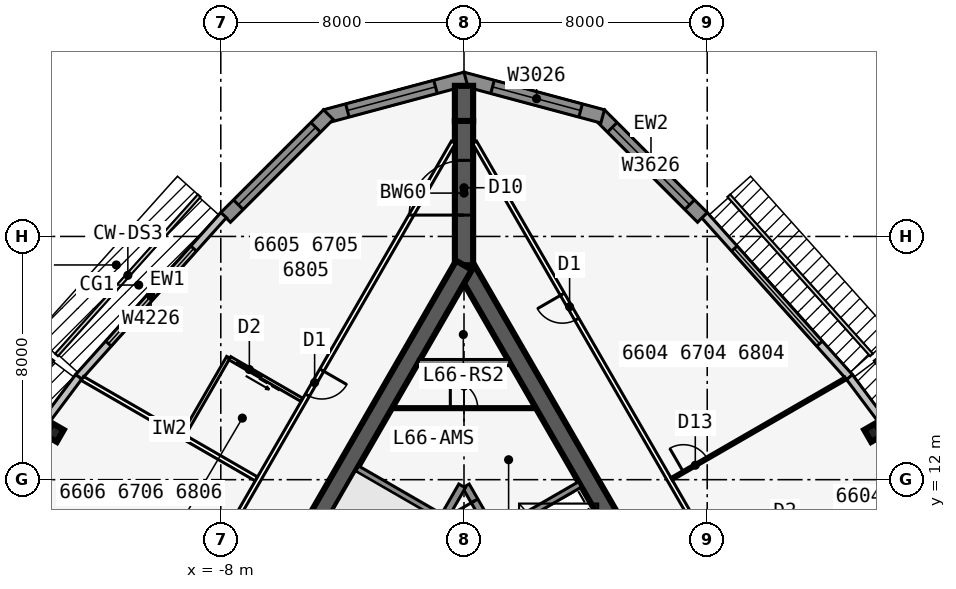
"""IFC4 building model, lengths in metres.
Left out: names, types, materials, properties, quantities, classifications, styles, units other than length and angle.
Written with IfcOpenShell. Run it as: python <this file> out.ifc"""

import sys

from ifc_helpers import new_model, si_unit, direction, frame, frame_2d, origin, origin_2d, place, context, subcontext, project, spatial, polyline, rectangle, i_section, outline, extrude, element, fill, save


model = new_model("IFC4")
c1 = context("Model", 3, precision=1e-05, world=origin(), true_north=direction((0.0, 1.0)))
c2 = subcontext(c1, "Body", "Model", "MODEL_VIEW")
j1 = project(units=[si_unit("LENGTHUNIT", "METRE"), si_unit("PLANEANGLEUNIT", "RADIAN")], contexts=[c1])
p1 = place(None, origin())
s1 = spatial("IfcSite", under=j1, at=p1, CompositionType="ELEMENT")
p2 = place(p1, origin())
s2 = spatial("IfcBuilding", under=s1, at=p2, CompositionType="ELEMENT")
p3 = place(p2, frame((0.0, 0.0, 250.1)))
s3 = spatial("IfcBuildingStorey", under=s2, at=p3, CompositionType="ELEMENT", Elevation=250.1)
p4 = place(p3, frame((16.5, -9.526, 0.0), z_axis=(0.0, 0.0, 1.0), x_axis=(-0.499999749417, 0.866025548458, 0.0)))
e1 = element("IfcWall", 1, at=p4, inside=s3, PredefinedType="SHEAR", context=c2, shape_type="SweptSolid", body=[
    extrude(rectangle(XDim=33.0, YDim=0.6, at=frame_2d((16.5, 0.0))), origin(), (0.0, 0.0, 1.0), 3.6),
])
p5 = place(p4, frame((14.15, 0.0, 0.0)))
e2 = element("IfcOpeningElement", 2, at=p5, cuts=e1, PredefinedType="OPENING", context=c2, shape_type="SweptSolid", body=[
    extrude(rectangle(XDim=1.8, YDim=2.13, at=frame_2d((0.9, 1.065))), frame((0.0, 0.31, 0.0), z_axis=(0.0, -1.0, 0.0), x_axis=(1.0, 0.0, 0.0)), (0.0, 0.0, 1.0), 0.62),
])
p6 = place(p4, frame((12.6, 0.0, 0.0)))
e3 = element("IfcOpeningElement", 3, at=p6, cuts=e1, PredefinedType="OPENING", context=c2, shape_type="SweptSolid", body=[
    extrude(rectangle(XDim=1.0, YDim=2.13, at=frame_2d((0.5, 1.065))), frame((0.0, 0.31, 0.0), z_axis=(0.0, -1.0, 0.0), x_axis=(1.0, 0.0, 0.0)), (0.0, 0.0, 1.0), 0.62),
])
p7 = place(p3, frame((5.379, 2.586, 0.0), z_axis=(0.0, 0.0, 1.0), x_axis=(-0.500001375892, 0.866024609411, 0.0)))
e4 = element("IfcWall", 4, at=p7, inside=s3, PredefinedType="SOLIDWALL", context=c2, shape_type="SweptSolid", body=[
    extrude(rectangle(XDim=10.633, YDim=0.25, at=frame_2d((5.316, 0.0))), origin(), (0.0, 0.0, 1.0), 3.435),
])
p8 = place(p7, frame((9.164, 0.0, 0.0)))
e5 = element("IfcOpeningElement", 5, at=p8, cuts=e4, PredefinedType="OPENING", context=c2, shape_type="SweptSolid", body=[
    extrude(rectangle(XDim=0.9, YDim=2.13, at=frame_2d((0.45, 1.065))), frame((0.0, 0.135, 0.0), z_axis=(0.0, -1.0, 0.0), x_axis=(1.0, 0.0, 0.0)), (0.0, 0.0, 1.0), 0.27),
])
p9 = place(p7, frame((1.0, 0.0, 0.0)))
e6 = element("IfcOpeningElement", 6, at=p9, cuts=e4, PredefinedType="OPENING", context=c2, shape_type="SweptSolid", body=[
    extrude(rectangle(XDim=1.1, YDim=2.13, at=frame_2d((0.55, 1.065))), frame((0.0, 0.135, 0.0), z_axis=(0.0, -1.0, 0.0), x_axis=(1.0, 0.0, 0.0)), (0.0, 0.0, 1.0), 0.27),
])
p10 = place(p7, frame((3.9, 0.0, 0.0)))
e7 = element("IfcOpeningElement", 7, at=p10, cuts=e4, PredefinedType="OPENING", context=c2, shape_type="SweptSolid", body=[
    extrude(rectangle(XDim=1.1, YDim=2.13, at=frame_2d((0.55, 1.065))), frame((0.0, 0.135, 0.0), z_axis=(0.0, -1.0, 0.0), x_axis=(1.0, 0.0, 0.0)), (0.0, 0.0, 1.0), 0.27),
])
p11 = place(p7, frame((6.8, 0.0, 0.0)))
e8 = element("IfcOpeningElement", 8, at=p11, cuts=e4, PredefinedType="OPENING", context=c2, shape_type="SweptSolid", body=[
    extrude(rectangle(XDim=1.1, YDim=2.13, at=frame_2d((0.55, 1.065))), frame((0.0, 0.135, 0.0), z_axis=(0.0, -1.0, 0.0), x_axis=(1.0, 0.0, 0.0)), (0.0, 0.0, 1.0), 0.27),
])
p12 = place(p3, frame((0.979, 10.207, 0.0), z_axis=(0.0, 0.0, 1.0), x_axis=(0.866027924134, 0.499995634601, 0.0)))
e9 = element("IfcWall", 9, at=p12, inside=s3, PredefinedType="SOLIDWALL", context=c2, shape_type="SweptSolid", body=[
    extrude(rectangle(XDim=3.275, YDim=0.2, at=frame_2d((1.637, 0.0))), origin(), (0.0, 0.0, 1.0), 3.435),
])
p13 = place(p3, frame((0.0, 19.052, 0.0), z_axis=(0.0, 0.0, 1.0), x_axis=(-0.499999749417, -0.866025548458, 0.0)))
e10 = element("IfcWall", 10, at=p13, inside=s3, PredefinedType="SHEAR", context=c2, shape_type="SweptSolid", body=[
    extrude(rectangle(XDim=33.0, YDim=0.6, at=frame_2d((16.5, 0.0))), origin(), (0.0, 0.0, 1.0), 3.6),
])
p14 = place(p13, frame((14.15, 0.0, 0.0)))
e11 = element("IfcOpeningElement", 11, at=p14, cuts=e10, PredefinedType="OPENING", context=c2, shape_type="SweptSolid", body=[
    extrude(rectangle(XDim=1.8, YDim=2.13, at=frame_2d((0.9, 1.065))), frame((0.0, 0.31, 0.0), z_axis=(0.0, -1.0, 0.0), x_axis=(1.0, 0.0, 0.0)), (0.0, 0.0, 1.0), 0.62),
])
p15 = place(p13, frame((12.6, 0.0, 0.0)))
e12 = element("IfcOpeningElement", 12, at=p15, cuts=e10, PredefinedType="OPENING", context=c2, shape_type="SweptSolid", body=[
    extrude(rectangle(XDim=1.0, YDim=2.13, at=frame_2d((0.5, 1.065))), frame((0.0, 0.31, 0.0), z_axis=(0.0, -1.0, 0.0), x_axis=(1.0, 0.0, 0.0)), (0.0, 0.0, 1.0), 0.62),
])
p16 = place(p3, frame((-0.062, 11.794, 0.0), z_axis=(0.0, 0.0, 1.0), x_axis=(-0.500006680225, -0.86602154692, 0.0)))
e13 = element("IfcWall", 13, at=p16, inside=s3, PredefinedType="SOLIDWALL", context=c2, shape_type="SweptSolid", body=[
    extrude(rectangle(XDim=7.733, YDim=0.25, at=frame_2d((3.866, 0.0))), origin(), (0.0, 0.0, 1.0), 3.435),
])
p17 = place(p3, frame((-0.679, 10.727, 0.0), z_axis=(0.0, 0.0, 1.0), x_axis=(-0.866027924134, 0.499995634601, 0.0)))
e14 = element("IfcWall", 14, at=p17, inside=s3, PredefinedType="SOLIDWALL", context=c2, shape_type="SweptSolid", body=[
    extrude(rectangle(XDim=3.275, YDim=0.2, at=frame_2d((1.637, 0.0))), origin(), (0.0, 0.0, 1.0), 3.435),
])
p18 = place(p3, frame((0.0, 19.052, 0.0), z_axis=(0.0, 0.0, 1.0), x_axis=(0.0, 1.0, 0.0)))
e15 = element("IfcWall", 15, at=p18, inside=s3, PredefinedType="SHEAR", context=c2, shape_type="SweptSolid", body=[
    extrude(rectangle(XDim=4.746, YDim=0.6, at=frame_2d((2.373, 0.0))), origin(), (0.0, 0.0, 1.0), 3.6),
])
p19 = place(p18, frame((1.65, 0.0, 0.0)))
e16 = element("IfcOpeningElement", 16, at=p19, cuts=e15, PredefinedType="OPENING", context=c2, shape_type="SweptSolid", body=[
    extrude(rectangle(XDim=1.8, YDim=2.13, at=frame_2d((0.9, 1.065))), frame((0.0, 0.31, 0.0), z_axis=(0.0, -1.0, 0.0), x_axis=(1.0, 0.0, 0.0)), (0.0, 0.0, 1.0), 0.62),
])
p20 = place(p3, frame((0.0, 23.799, 0.0), z_axis=(0.0, 0.0, 1.0), x_axis=(0.0, 1.0, 0.0)))
e17 = element("IfcWall", 17, at=p20, inside=s3, PredefinedType="SHEAR", context=c2, shape_type="SweptSolid", body=[
    extrude(rectangle(XDim=1.155, YDim=0.6, at=frame_2d((0.577, 0.0))), origin(), (0.0, 0.0, 1.0), 3.6),
])
for number, where, z_axis, x_axis in (
    (18, (13.461, 13.545, 0.0), (0.0, 0.0, 1.0), (0.866, 0.5, 0.0)),
    (19, (-13.461, 13.545, 0.0), (0.0, 0.0, 1.0), (-0.866, 0.5, 0.0)),
):
    element("IfcColumn", number, at=place(p3, frame(where, z_axis=z_axis, x_axis=x_axis)), inside=s3, PredefinedType="COLUMN", context=c2, shape_type="SweptSolid", body=[
        extrude(i_section(OverallWidth=0.419, OverallDepth=0.455, WebThickness=0.042, FlangeThickness=0.068, at=origin_2d()), origin(), (0.0, 0.0, 1.0), 3.6),
    ])
p21 = place(p3, frame((13.881, 13.771, 0.0), z_axis=(0.0, 0.0, 1.0), x_axis=(-0.599650843534, 0.800261748335, 0.0)))
e20 = element("IfcWall", 20, at=p21, inside=s3, PredefinedType="STANDARD", context=c2, shape_type="SweptSolid", body=[
    extrude(rectangle(XDim=2.014, YDim=0.25, at=frame_2d((1.007, 0.0))), origin(), (0.0, 0.0, 1.0), 3.435),
])
p22 = place(p3, frame((12.68, 15.374, 0.0), z_axis=(0.0, 0.0, 1.0), x_axis=(-0.667303550892, 0.744785855778, 0.0)))
e21 = element("IfcWall", 21, at=p22, inside=s3, PredefinedType="STANDARD", context=c2, shape_type="SweptSolid", body=[
    extrude(rectangle(XDim=7.153, YDim=0.25, at=frame_2d((3.576, 0.0))), origin(), (0.0, 0.0, 1.0), 3.435),
])
p23 = place(p22, frame((1.476, 0.0, 0.45)))
e22 = element("IfcOpeningElement", 22, at=p23, cuts=e21, PredefinedType="OPENING", context=c2, shape_type="SweptSolid", body=[
    extrude(rectangle(XDim=4.2, YDim=2.6, at=frame_2d((2.1, 1.3))), frame((0.0, 0.135, 0.0), z_axis=(0.0, -1.0, 0.0), x_axis=(1.0, 0.0, 0.0)), (0.0, 0.0, 1.0), 0.27),
])
p24 = place(p3, frame((7.841, 20.625, 0.0), z_axis=(0.0, 0.0, 1.0), x_axis=(-0.707106781187, 0.707106781187, 0.0)))
e23 = element("IfcWall", 23, at=p24, inside=s3, PredefinedType="SOLIDWALL", context=c2, shape_type="SweptSolid", body=[
    extrude(rectangle(XDim=4.781, YDim=0.45, at=frame_2d((2.391, 0.0))), origin(), (0.0, 0.0, 1.0), 3.435),
])
p25 = place(p24, frame((0.591, 0.0, 0.45)))
e24 = element("IfcOpeningElement", 24, at=p25, cuts=e23, PredefinedType="OPENING", context=c2, shape_type="SweptSolid", body=[
    extrude(rectangle(XDim=3.6, YDim=2.6, at=frame_2d((1.8, 1.3))), frame((0.0, 0.235, 0.0), z_axis=(0.0, -1.0, 0.0), x_axis=(1.0, 0.0, 0.0)), (0.0, 0.0, 1.0), 0.47),
])
p26 = place(p3, frame((4.561, 23.948, 0.0), z_axis=(0.0, 0.0, 1.0), x_axis=(-0.965926628191, 0.258816052347, 0.0)))
e25 = element("IfcWall", 25, at=p26, inside=s3, PredefinedType="SOLIDWALL", context=c2, shape_type="SweptSolid", body=[
    extrude(outline(polyline([(4.781, 0.225), (4.722, 0.225), (4.375, 0.132), (4.351, 0.225), (0.0, 0.225), (0.0, -0.225), (4.781, -0.225), (4.781, 0.225)])), origin(), (0.0, 0.0, 1.0), 3.435),
])
p27 = place(p26, frame((0.75, 0.0, 0.45)))
e26 = element("IfcOpeningElement", 26, at=p27, cuts=e25, PredefinedType="OPENING", context=c2, shape_type="SweptSolid", body=[
    extrude(rectangle(XDim=3.0, YDim=2.6, at=frame_2d((1.5, 1.3))), frame((0.0, 0.235, 0.0), z_axis=(0.0, -1.0, 0.0), x_axis=(1.0, 0.0, 0.0)), (0.0, 0.0, 1.0), 0.47),
])
p28 = place(p3, frame((0.058, 25.186, 0.0), z_axis=(0.0, 0.0, 1.0), x_axis=(-0.965926628191, -0.258816052347, 0.0)))
e27 = element("IfcWall", 27, at=p28, inside=s3, PredefinedType="SOLIDWALL", context=c2, shape_type="SweptSolid", body=[
    extrude(outline(polyline([(4.781, 0.225), (0.431, 0.225), (0.406, 0.132), (0.059, 0.225), (0.0, 0.225), (0.0, -0.225), (4.781, -0.225), (4.781, 0.225)])), origin(), (0.0, 0.0, 1.0), 3.435),
])
p29 = place(p28, frame((1.031, 0.0, 0.45)))
e28 = element("IfcOpeningElement", 28, at=p29, cuts=e27, PredefinedType="OPENING", context=c2, shape_type="SweptSolid", body=[
    extrude(rectangle(XDim=3.0, YDim=2.6, at=frame_2d((1.5, 1.3))), frame((0.0, 0.235, 0.0), z_axis=(0.0, -1.0, 0.0), x_axis=(1.0, 0.0, 0.0)), (0.0, 0.0, 1.0), 0.47),
])
p30 = place(p3, frame((-4.46, 24.007, 0.0), z_axis=(0.0, 0.0, 1.0), x_axis=(-0.707106781187, -0.707106781187, 0.0)))
e29 = element("IfcWall", 29, at=p30, inside=s3, PredefinedType="SOLIDWALL", context=c2, shape_type="SweptSolid", body=[
    extrude(rectangle(XDim=4.781, YDim=0.45, at=frame_2d((2.391, 0.0))), origin(), (0.0, 0.0, 1.0), 3.435),
])
p31 = place(p30, frame((0.591, 0.0, 0.45)))
e30 = element("IfcOpeningElement", 30, at=p31, cuts=e29, PredefinedType="OPENING", context=c2, shape_type="SweptSolid", body=[
    extrude(rectangle(XDim=3.6, YDim=2.6, at=frame_2d((1.8, 1.3))), frame((0.0, 0.235, 0.0), z_axis=(0.0, -1.0, 0.0), x_axis=(1.0, 0.0, 0.0)), (0.0, 0.0, 1.0), 0.47),
])
p32 = place(p3, frame((-7.907, 20.701, 0.0), z_axis=(0.0, 0.0, 1.0), x_axis=(-0.667303550892, -0.744785855778, 0.0)))
e31 = element("IfcWall", 31, at=p32, inside=s3, PredefinedType="STANDARD", context=c2, shape_type="SweptSolid", body=[
    extrude(rectangle(XDim=7.153, YDim=0.25, at=frame_2d((3.576, 0.0))), origin(), (0.0, 0.0, 1.0), 3.435),
])
p33 = place(p32, frame((1.476, 0.0, 0.45)))
e32 = element("IfcOpeningElement", 32, at=p33, cuts=e31, PredefinedType="OPENING", context=c2, shape_type="SweptSolid", body=[
    extrude(rectangle(XDim=4.2, YDim=2.6, at=frame_2d((2.1, 1.3))), frame((0.0, 0.135, 0.0), z_axis=(0.0, -1.0, 0.0), x_axis=(1.0, 0.0, 0.0)), (0.0, 0.0, 1.0), 0.27),
])
p34 = place(p3, frame((-12.673, 15.382, 0.0), z_axis=(0.0, 0.0, 1.0), x_axis=(-0.599650843534, -0.800261748335, 0.0)))
e33 = element("IfcWall", 33, at=p34, inside=s3, PredefinedType="STANDARD", context=c2, shape_type="SweptSolid", body=[
    extrude(rectangle(XDim=2.014, YDim=0.25, at=frame_2d((1.007, 0.0))), origin(), (0.0, 0.0, 1.0), 3.435),
])
p35 = place(p3, frame((20.177, -11.245, 0.0), z_axis=(0.0, 0.0, 1.0), x_axis=(-0.499998875317, 0.866026053119, 0.0)))
e34 = element("IfcWall", 34, at=p35, inside=s3, PredefinedType="PARTITIONING", context=c2, shape_type="SweptSolid", body=[
    extrude(rectangle(XDim=39.654, YDim=0.15, at=frame_2d((19.827, 0.0))), origin(), (0.0, 0.0, 1.0), 3.435),
])
p36 = place(p35, frame((5.772, 0.0, 0.0)))
e35 = element("IfcOpeningElement", 35, at=p36, cuts=e34, PredefinedType="OPENING", context=c2, shape_type="SweptSolid", body=[
    extrude(rectangle(XDim=0.95, YDim=2.13, at=frame_2d((0.475, 1.065))), frame((0.0, 0.085, 0.0), z_axis=(0.0, -1.0, 0.0), x_axis=(1.0, 0.0, 0.0)), (0.0, 0.0, 1.0), 0.17),
])
p37 = place(p35, frame((32.932, 0.0, 0.0)))
e36 = element("IfcOpeningElement", 36, at=p37, cuts=e34, PredefinedType="OPENING", context=c2, shape_type="SweptSolid", body=[
    extrude(rectangle(XDim=0.95, YDim=2.13, at=frame_2d((0.475, 1.065))), frame((0.0, 0.085, 0.0), z_axis=(0.0, -1.0, 0.0), x_axis=(1.0, 0.0, 0.0)), (0.0, 0.0, 1.0), 0.17),
])
p38 = place(p3, frame((6.829, 12.025, 0.0), z_axis=(0.0, 0.0, 1.0), x_axis=(0.866029323189, 0.499993211332, 0.0)))
e37 = element("IfcWall", 37, at=p38, inside=s3, PredefinedType="PARTITIONING", context=c2, shape_type="SweptSolid", body=[
    extrude(rectangle(XDim=6.608, YDim=0.1, at=frame_2d((3.304, 0.0))), origin(), (0.0, 0.0, 1.0), 2.678),
])
p39 = place(p38, frame((0.45, 0.0, 0.0)))
e38 = element("IfcOpeningElement", 38, at=p39, cuts=e37, PredefinedType="OPENING", context=c2, shape_type="SweptSolid", body=[
    extrude(rectangle(XDim=0.9, YDim=2.13, at=frame_2d((0.45, 1.065))), frame((0.0, 0.06, 0.0), z_axis=(0.0, -1.0, 0.0), x_axis=(1.0, 0.0, 0.0)), (0.0, 0.0, 1.0), 0.12),
])
p40 = place(p3, frame((-0.35, 23.096, 0.0), z_axis=(0.0, 0.0, 1.0), x_axis=(-0.499998875317, -0.866026053119, 0.0)))
e39 = element("IfcWall", 39, at=p40, inside=s3, PredefinedType="PARTITIONING", context=c2, shape_type="SweptSolid", body=[
    extrude(rectangle(XDim=39.654, YDim=0.15, at=frame_2d((19.827, 0.0))), origin(), (0.0, 0.0, 1.0), 3.435),
])
p41 = place(p40, frame((8.652, 0.0, 0.0)))
e40 = element("IfcOpeningElement", 40, at=p41, cuts=e39, PredefinedType="OPENING", context=c2, shape_type="SweptSolid", body=[
    extrude(rectangle(XDim=0.95, YDim=2.13, at=frame_2d((0.475, 1.065))), frame((0.0, 0.085, 0.0), z_axis=(0.0, -1.0, 0.0), x_axis=(1.0, 0.0, 0.0)), (0.0, 0.0, 1.0), 0.17),
])
p42 = place(p40, frame((15.852, 0.0, 0.0)))
e41 = element("IfcOpeningElement", 41, at=p42, cuts=e39, PredefinedType="OPENING", context=c2, shape_type="SweptSolid", body=[
    extrude(rectangle(XDim=0.95, YDim=2.13, at=frame_2d((0.475, 1.065))), frame((0.0, 0.085, 0.0), z_axis=(0.0, -1.0, 0.0), x_axis=(1.0, 0.0, 0.0)), (0.0, 0.0, 1.0), 0.17),
])
p43 = place(p40, frame((30.052, 0.0, 0.0)))
e42 = element("IfcOpeningElement", 42, at=p43, cuts=e39, PredefinedType="OPENING", context=c2, shape_type="SweptSolid", body=[
    extrude(rectangle(XDim=0.95, YDim=2.13, at=frame_2d((0.475, 1.065))), frame((0.0, 0.085, 0.0), z_axis=(0.0, -1.0, 0.0), x_axis=(1.0, 0.0, 0.0)), (0.0, 0.0, 1.0), 0.17),
])
p44 = place(p3, frame((-6.829, 12.025, 0.0), z_axis=(0.0, 0.0, 1.0), x_axis=(-0.866029323189, 0.499993211332, 0.0)))
e43 = element("IfcWall", 43, at=p44, inside=s3, PredefinedType="PARTITIONING", context=c2, shape_type="SweptSolid", body=[
    extrude(rectangle(XDim=6.608, YDim=0.15, at=frame_2d((3.304, 0.0))), origin(), (0.0, 0.0, 1.0), 2.678),
])
p45 = place(p3, frame((-7.753, 16.023, 0.0), z_axis=(0.0, 0.0, 1.0), x_axis=(-0.499990139034, -0.866031096941, 0.0)))
e44 = element("IfcWall", 44, at=p45, inside=s3, PredefinedType="PLUMBINGWALL", context=c2, shape_type="SweptSolid", body=[
    extrude(rectangle(XDim=3.0, YDim=0.12, at=frame_2d((1.5, 0.0))), origin(), (0.0, 0.0, 1.0), 3.435),
])
p46 = place(p3, frame((-5.329, 14.623, 0.0), z_axis=(0.0, 0.0, 1.0), x_axis=(-0.865997131366, 0.500048966069, 0.0)))
e45 = element("IfcWall", 45, at=p46, inside=s3, PredefinedType="PLUMBINGWALL", context=c2, shape_type="SweptSolid", body=[
    extrude(rectangle(XDim=2.74, YDim=0.12, at=frame_2d((1.37, 0.0))), origin(), (0.0, 0.0, 1.0), 3.435),
])
p47 = place(p46, frame((1.55, 0.0, 0.0)))
e46 = element("IfcOpeningElement", 46, at=p47, cuts=e45, PredefinedType="OPENING", context=c2, shape_type="SweptSolid", body=[
    extrude(rectangle(XDim=0.9, YDim=2.13, at=frame_2d((0.45, 1.065))), frame((0.0, 0.07, 0.0), z_axis=(0.0, -1.0, 0.0), x_axis=(1.0, 0.0, 0.0)), (0.0, 0.0, 1.0), 0.14),
])
p48 = place(p3, frame((-1.501, 15.853, 0.0), z_axis=(0.0, 0.0, 1.0), x_axis=(1.0, 0.0, 0.0)))
e47 = element("IfcWall", 47, at=p48, inside=s3, PredefinedType="SOLIDWALL", context=c2, shape_type="SweptSolid", body=[
    extrude(rectangle(XDim=3.002, YDim=0.2, at=frame_2d((1.501, 0.0))), origin(), (0.0, 0.0, 1.0), 3.435),
])
p49 = place(p3, frame((-2.367, 14.353, 0.0), z_axis=(0.0, 0.0, 1.0), x_axis=(1.0, 0.0, 0.0)))
e48 = element("IfcWall", 48, at=p49, inside=s3, PredefinedType="PARTITIONING", context=c2, shape_type="SweptSolid", body=[
    extrude(rectangle(XDim=4.734, YDim=0.1, at=frame_2d((2.367, 0.0))), origin(), (0.0, 0.0, 1.0), 3.435),
])
p50 = place(p49, frame((1.917, 0.0, 0.0)))
e49 = element("IfcOpeningElement", 49, at=p50, cuts=e48, PredefinedType="OPENING", context=c2, shape_type="SweptSolid", body=[
    extrude(rectangle(XDim=0.9, YDim=2.13, at=frame_2d((0.45, 1.065))), frame((0.0, 0.06, 0.0), z_axis=(0.0, -1.0, 0.0), x_axis=(1.0, 0.0, 0.0)), (0.0, 0.0, 1.0), 0.12),
])
p51 = place(p23, origin())
e50 = element("IfcWindow", 50, at=p51, inside=s3, PartitioningType="SINGLE_PANEL", PredefinedType="WINDOW", context=c2, shape_type="SweptSolid", body=[
    extrude(rectangle(XDim=4.2, YDim=2.6, at=frame_2d((2.1, 1.3))), frame((0.0, 0.03, 0.0), z_axis=(0.0, -1.0, 0.0), x_axis=(1.0, 0.0, 0.0)), (0.0, 0.0, 1.0), 0.06),
])
fill(e22, e50)
p52 = place(p25, origin())
e51 = element("IfcWindow", 51, at=p52, inside=s3, PartitioningType="SINGLE_PANEL", PredefinedType="WINDOW", context=c2, shape_type="SweptSolid", body=[
    extrude(rectangle(XDim=3.6, YDim=2.6, at=frame_2d((1.8, 1.3))), frame((0.0, 0.03, 0.0), z_axis=(0.0, -1.0, 0.0), x_axis=(1.0, 0.0, 0.0)), (0.0, 0.0, 1.0), 0.06),
])
fill(e24, e51)
p53 = place(p27, origin())
e52 = element("IfcWindow", 52, at=p53, inside=s3, PartitioningType="SINGLE_PANEL", PredefinedType="WINDOW", context=c2, shape_type="SweptSolid", body=[
    extrude(rectangle(XDim=3.0, YDim=2.6, at=frame_2d((1.5, 1.3))), frame((0.0, 0.03, 0.0), z_axis=(0.0, -1.0, 0.0), x_axis=(1.0, 0.0, 0.0)), (0.0, 0.0, 1.0), 0.06),
])
fill(e26, e52)
p54 = place(p29, origin())
e53 = element("IfcWindow", 53, at=p54, inside=s3, PartitioningType="SINGLE_PANEL", PredefinedType="WINDOW", context=c2, shape_type="SweptSolid", body=[
    extrude(rectangle(XDim=3.0, YDim=2.6, at=frame_2d((1.5, 1.3))), frame((0.0, 0.03, 0.0), z_axis=(0.0, -1.0, 0.0), x_axis=(1.0, 0.0, 0.0)), (0.0, 0.0, 1.0), 0.06),
])
fill(e28, e53)
p55 = place(p31, origin())
e54 = element("IfcWindow", 54, at=p55, inside=s3, PartitioningType="SINGLE_PANEL", PredefinedType="WINDOW", context=c2, shape_type="SweptSolid", body=[
    extrude(rectangle(XDim=3.6, YDim=2.6, at=frame_2d((1.8, 1.3))), frame((0.0, 0.03, 0.0), z_axis=(0.0, -1.0, 0.0), x_axis=(1.0, 0.0, 0.0)), (0.0, 0.0, 1.0), 0.06),
])
fill(e30, e54)
p56 = place(p33, origin())
e55 = element("IfcWindow", 55, at=p56, inside=s3, PartitioningType="SINGLE_PANEL", PredefinedType="WINDOW", context=c2, shape_type="SweptSolid", body=[
    extrude(rectangle(XDim=4.2, YDim=2.6, at=frame_2d((2.1, 1.3))), frame((0.0, 0.03, 0.0), z_axis=(0.0, -1.0, 0.0), x_axis=(1.0, 0.0, 0.0)), (0.0, 0.0, 1.0), 0.06),
])
fill(e32, e55)
p57 = place(p39, origin())
e56 = element("IfcDoor", 56, at=p57, inside=s3, OperationType="SINGLE_SWING_LEFT", PredefinedType="DOOR", context=c2, shape_type="SweptSolid", body=[
    extrude(rectangle(XDim=0.9, YDim=2.13, at=frame_2d((0.45, 1.065))), frame((0.0, 0.025, 0.0), z_axis=(0.0, -1.0, 0.0), x_axis=(1.0, 0.0, 0.0)), (0.0, 0.0, 1.0), 0.05),
])
fill(e38, e56)
p58 = place(p37, origin())
e57 = element("IfcDoor", 57, at=p58, inside=s3, OperationType="SINGLE_SWING_RIGHT", PredefinedType="DOOR", context=c2, shape_type="SweptSolid", body=[
    extrude(rectangle(XDim=0.95, YDim=2.13, at=frame_2d((0.475, 1.065))), frame((0.0, 0.025, 0.0), z_axis=(0.0, -1.0, 0.0), x_axis=(1.0, 0.0, 0.0)), (0.0, 0.0, 1.0), 0.05),
])
fill(e36, e57)
p59 = place(p47, origin())
e58 = element("IfcDoor", 58, at=p59, inside=s3, OperationType="SLIDING_TO_LEFT", PredefinedType="DOOR", context=c2, shape_type="SweptSolid", body=[
    extrude(rectangle(XDim=0.9, YDim=2.13, at=frame_2d((0.45, 1.065))), frame((0.0, 0.025, 0.0), z_axis=(0.0, -1.0, 0.0), x_axis=(1.0, 0.0, 0.0)), (0.0, 0.0, 1.0), 0.05),
])
fill(e46, e58)
p60 = place(p41, origin())
e59 = element("IfcDoor", 59, at=p60, inside=s3, OperationType="SINGLE_SWING_LEFT", PredefinedType="DOOR", context=c2, shape_type="SweptSolid", body=[
    extrude(rectangle(XDim=0.95, YDim=2.13, at=frame_2d((0.475, 1.065))), frame((0.0, 0.025, 0.0), z_axis=(0.0, -1.0, 0.0), x_axis=(1.0, 0.0, 0.0)), (0.0, 0.0, 1.0), 0.05),
])
fill(e40, e59)
p61 = place(p19, origin())
e60 = element("IfcDoor", 60, at=p61, inside=s3, OperationType="DOUBLE_DOOR_DOUBLE_SWING", PredefinedType="DOOR", context=c2, shape_type="SweptSolid", body=[
    extrude(rectangle(XDim=1.8, YDim=2.13, at=frame_2d((0.9, 1.065))), frame((0.0, 0.025, 0.0), z_axis=(0.0, -1.0, 0.0), x_axis=(1.0, 0.0, 0.0)), (0.0, 0.0, 1.0), 0.05),
])
fill(e16, e60)
p62 = place(p50, origin())
e61 = element("IfcDoor", 61, at=p62, inside=s3, OperationType="SINGLE_SWING_LEFT", PredefinedType="DOOR", context=c2, shape_type="SweptSolid", body=[
    extrude(rectangle(XDim=0.9, YDim=2.13, at=frame_2d((0.45, 1.065))), frame((0.0, 0.025, 0.0), z_axis=(0.0, -1.0, 0.0), x_axis=(1.0, 0.0, 0.0)), (0.0, 0.0, 1.0), 0.05),
])
fill(e49, e61)
p63 = place(p8, origin())
e62 = element("IfcDoor", 62, at=p63, inside=s3, OperationType="SINGLE_SWING_RIGHT", PredefinedType="DOOR", context=c2, shape_type="SweptSolid", body=[
    extrude(rectangle(XDim=0.9, YDim=2.13, at=frame_2d((0.45, 1.065))), frame((0.0, 0.025, 0.0), z_axis=(0.0, -1.0, 0.0), x_axis=(1.0, 0.0, 0.0)), (0.0, 0.0, 1.0), 0.05),
])
fill(e5, e62)
save(model, sys.argv[1])
